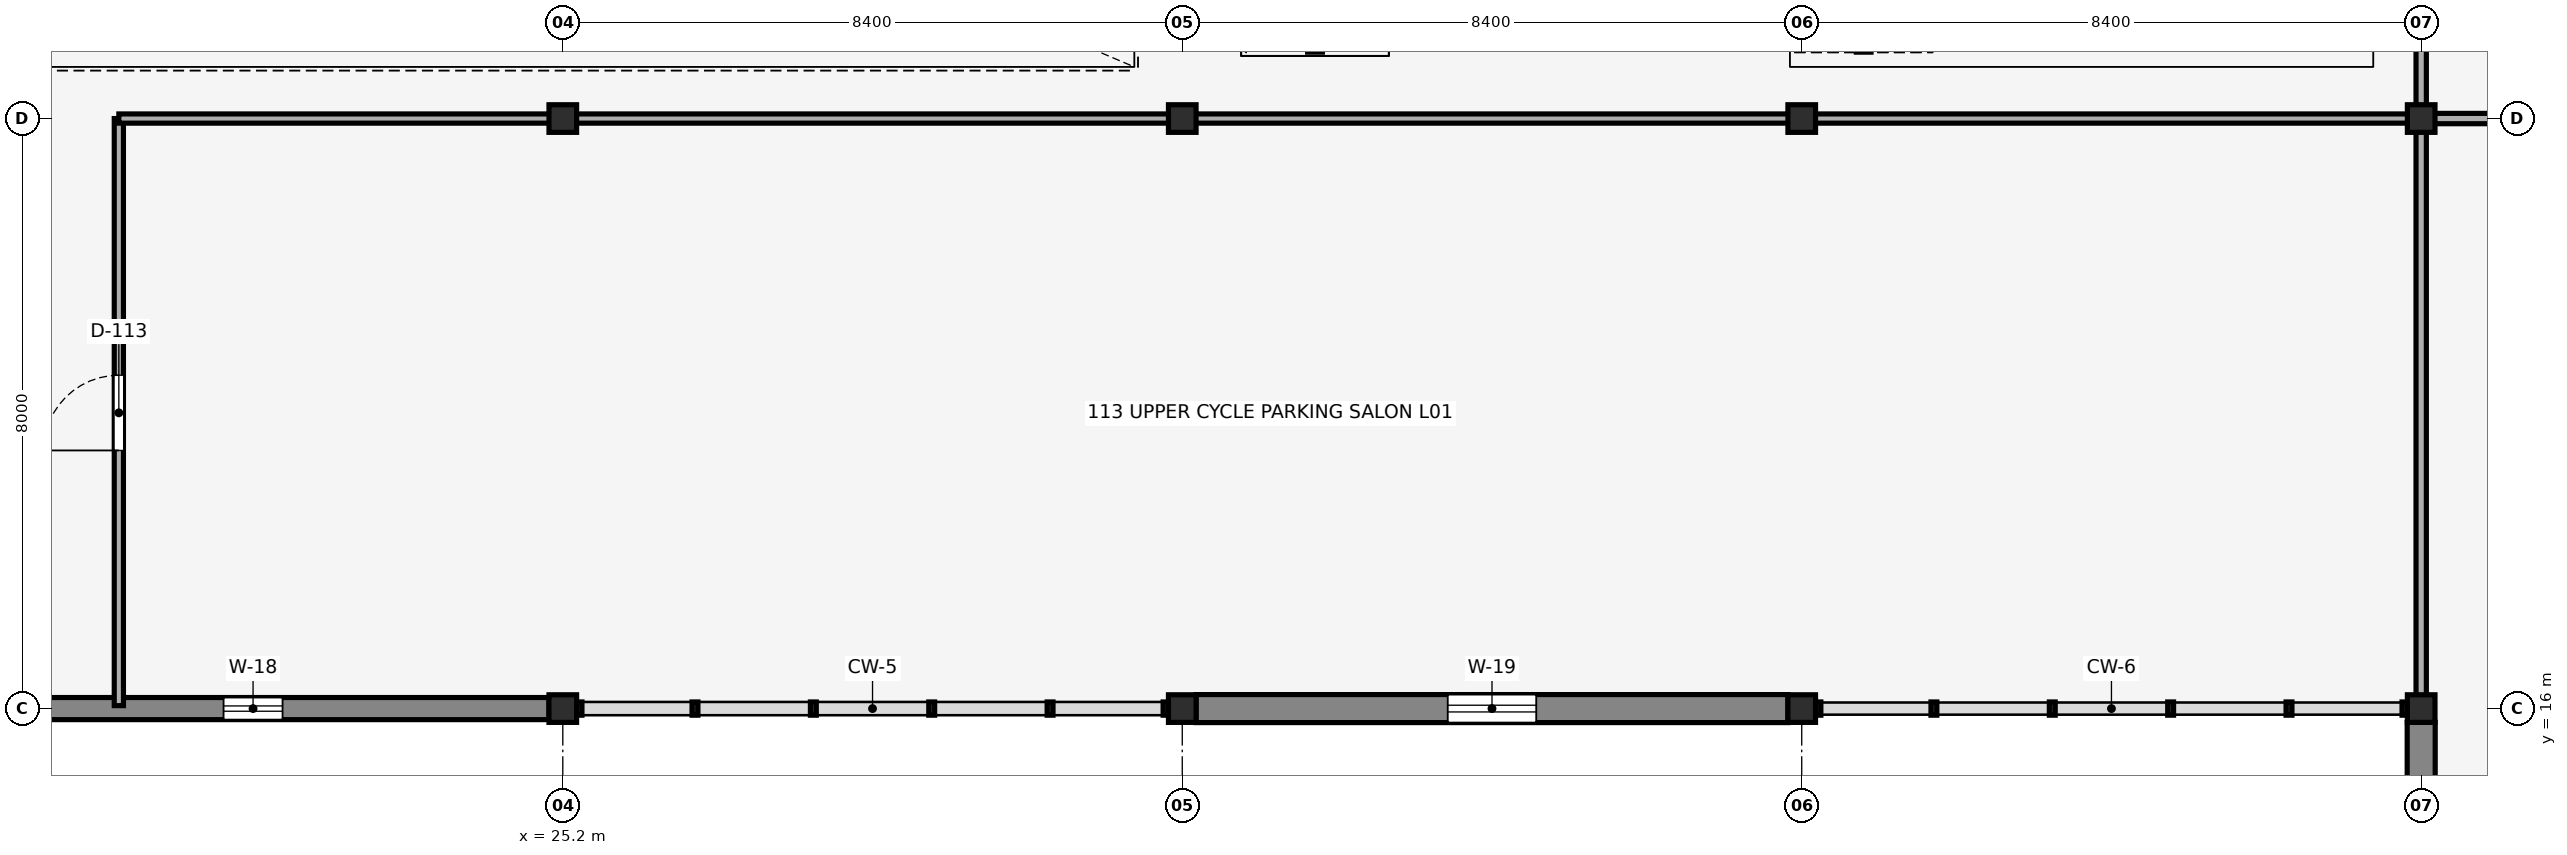
"""IFC4 building model, lengths in metres.
Left out: names, types, materials, properties, quantities, classifications, styles, units other than length and angle.
Written with IfcOpenShell. Run it as: python <this file> out.ifc"""

import sys

from ifc_helpers import new_model, si_unit, direction, frame, frame_2d, origin, origin_2d, place, context, subcontext, project, spatial, rectangle, i_section, extrude, element, fill, save


model = new_model("IFC4")
c1 = context("Model", 3, precision=1e-05, world=origin(), true_north=direction((0.0, 1.0)))
c2 = subcontext(c1, "Body", "Model", "MODEL_VIEW")
j1 = project(units=[si_unit("LENGTHUNIT", "METRE"), si_unit("PLANEANGLEUNIT", "RADIAN")], contexts=[c1])
p1 = place(None, origin())
s1 = spatial("IfcSite", under=j1, at=p1, CompositionType="ELEMENT")
p2 = place(p1, origin())
s2 = spatial("IfcBuilding", under=s1, at=p2, CompositionType="ELEMENT")
p3 = place(p2, frame((0.0, 0.0, 5.44)))
s3 = spatial("IfcBuildingStorey", under=s2, at=p3, CompositionType="ELEMENT", Elevation=5.44)
for number, where, z_axis, x_axis in (
    (1, (25.2, 16.0, 0.0), (0.0, 0.0, 1.0), (1.0, 0.0, 0.0)),
    (2, (25.2, 24.0, 0.0), (0.0, 0.0, 1.0), (1.0, 0.0, 0.0)),
    (3, (33.6, 16.0, 0.0), (0.0, 0.0, 1.0), (1.0, 0.0, 0.0)),
    (4, (33.6, 24.0, 0.0), (0.0, 0.0, 1.0), (1.0, 0.0, 0.0)),
    (5, (42.0, 16.0, 0.0), (0.0, 0.0, 1.0), (1.0, 0.0, 0.0)),
    (6, (42.0, 24.0, 0.0), (0.0, 0.0, 1.0), (1.0, 0.0, 0.0)),
    (7, (50.4, 16.0, 0.0), (0.0, 0.0, 1.0), (1.0, 0.0, 0.0)),
    (8, (50.4, 24.0, 0.0), (0.0, 0.0, 1.0), (1.0, 0.0, 0.0)),
):
    element("IfcColumn", number, at=place(p3, frame(where, z_axis=z_axis, x_axis=x_axis)), inside=s3, PredefinedType="COLUMN", context=c2, shape_type="SweptSolid", body=[
        extrude(i_section(OverallWidth=0.375, OverallDepth=0.375, WebThickness=0.017, FlangeThickness=0.027, FilletRadius=0.015, at=origin_2d()), origin(), (0.0, 0.0, 1.0), 3.8),
    ])
p4 = place(p3, frame((50.4, 8.16, 0.0), z_axis=(0.0, 0.0, 1.0), x_axis=(0.0, 1.0, 0.0)))
e9 = element("IfcWall", 9, at=p4, inside=s3, PredefinedType="SOLIDWALL", context=c2, shape_type="SweptSolid", body=[
    extrude(rectangle(XDim=7.652, YDim=0.38, at=frame_2d((3.826, 0.0))), origin(), (0.0, 0.0, 1.0), 3.442),
])
p5 = place(p4, frame((3.351, 0.0, 0.65), z_axis=(0.0, 0.0, 1.0), x_axis=(1.0, 0.0, 0.0)))
e10 = element("IfcOpeningElement", 10, at=p5, cuts=e9, PredefinedType="OPENING", context=c2, shape_type="SweptSolid", body=[
    extrude(rectangle(XDim=0.95, YDim=2.1, at=frame_2d((0.475, 1.05))), frame((0.0, 0.2, 0.0), z_axis=(0.0, -1.0, 0.0), x_axis=(1.0, 0.0, 0.0)), (0.0, 0.0, 1.0), 0.4),
])
p6 = place(p3, frame((16.987, 16.0, 0.0), z_axis=(0.0, 0.0, 1.0), x_axis=(1.0, 0.0, 0.0)))
e11 = element("IfcWall", 11, at=p6, inside=s3, PredefinedType="SOLIDWALL", context=c2, shape_type="SweptSolid", body=[
    extrude(rectangle(XDim=8.025, YDim=0.3, at=frame_2d((4.013, 0.0))), origin(), (0.0, 0.0, 1.0), 3.45),
])
p7 = place(p6, frame((3.613, 0.0, 0.65), z_axis=(0.0, 0.0, 1.0), x_axis=(1.0, 0.0, 0.0)))
e12 = element("IfcOpeningElement", 12, at=p7, cuts=e11, PredefinedType="OPENING", context=c2, shape_type="SweptSolid", body=[
    extrude(rectangle(XDim=0.8, YDim=1.85, at=frame_2d((0.4, 0.925))), frame((0.0, 0.16, 0.0), z_axis=(0.0, -1.0, 0.0), x_axis=(1.0, 0.0, 0.0)), (0.0, 0.0, 1.0), 0.32),
])
p8 = place(p3, frame((33.787, 16.0, 0.0), z_axis=(0.0, 0.0, 1.0), x_axis=(1.0, 0.0, 0.0)))
e13 = element("IfcWall", 13, at=p8, inside=s3, PredefinedType="SOLIDWALL", context=c2, shape_type="SweptSolid", body=[
    extrude(rectangle(XDim=8.025, YDim=0.38, at=frame_2d((4.013, 0.0))), origin(), (0.0, 0.0, 1.0), 3.45),
])
p9 = place(p8, frame((3.413, 0.0, 1.55), z_axis=(0.0, 0.0, 1.0), x_axis=(1.0, 0.0, 0.0)))
e14 = element("IfcOpeningElement", 14, at=p9, cuts=e13, PredefinedType="OPENING", context=c2, shape_type="SweptSolid", body=[
    extrude(rectangle(XDim=1.2, YDim=0.95, at=frame_2d((0.6, 0.475))), frame((0.0, 0.2, 0.0), z_axis=(0.0, -1.0, 0.0), x_axis=(1.0, 0.0, 0.0)), (0.0, 0.0, 1.0), 0.4),
])
p10 = place(p3, frame((50.577, 24.0, 0.0), z_axis=(0.0, 0.0, 1.0), x_axis=(1.0, 0.0, 0.0)))
e15 = element("IfcWall", 15, at=p10, inside=s3, PredefinedType="PARTITIONING", context=c2, shape_type="SweptSolid", body=[
    extrude(rectangle(XDim=8.045, YDim=0.14, at=frame_2d((4.023, 0.0))), origin(), (0.0, 0.0, 1.0), 3.26),
])
p11 = place(p10, frame((4.703, 0.0, 0.0), z_axis=(0.0, 0.0, 1.0), x_axis=(-1.0, 0.0, 0.0)))
e16 = element("IfcOpeningElement", 16, at=p11, cuts=e15, PredefinedType="OPENING", context=c2, shape_type="SweptSolid", body=[
    extrude(rectangle(XDim=1.18, YDim=2.22, at=frame_2d((0.59, 1.11))), frame((0.0, 0.08, 0.0), z_axis=(0.0, -1.0, 0.0), x_axis=(1.0, 0.0, 0.0)), (0.0, 0.0, 1.0), 0.16),
])
p12 = place(p3, frame((19.18, 16.04, 0.0), z_axis=(0.0, 0.0, 1.0), x_axis=(0.0, 1.0, 0.0)))
e17 = element("IfcWall", 17, at=p12, inside=s3, PredefinedType="PARTITIONING", context=c2, shape_type="SweptSolid", body=[
    extrude(rectangle(XDim=7.96, YDim=0.125, at=frame_2d((3.98, 0.0))), origin(), (0.0, 0.0, 1.0), 3.442),
])
p13 = place(p12, frame((3.46, 0.0, 0.0), z_axis=(0.0, 0.0, 1.0), x_axis=(1.0, 0.0, 0.0)))
e18 = element("IfcOpeningElement", 18, at=p13, cuts=e17, PredefinedType="OPENING", context=c2, shape_type="SweptSolid", body=[
    extrude(rectangle(XDim=1.02, YDim=2.16, at=frame_2d((0.51, 1.08))), frame((0.0, 0.073, 0.0), z_axis=(0.0, -1.0, 0.0), x_axis=(1.0, 0.0, 0.0)), (0.0, 0.0, 1.0), 0.145),
])
for number, where, z_axis, x_axis in (
    (19, (50.4, 24.177, 0.0), (0.0, 0.0, 1.0), (0.0, 1.0, 0.0)),
    (20, (50.4, 16.177, 0.0), (0.0, 0.0, 1.0), (0.0, 1.0, 0.0)),
):
    element("IfcWall", number, at=place(p3, frame(where, z_axis=z_axis, x_axis=x_axis)), inside=s3, PredefinedType="PARTITIONING", context=c2, shape_type="SweptSolid", body=[
        extrude(rectangle(XDim=7.646, YDim=0.14, at=frame_2d((3.823, 0.0))), origin(), (0.0, 0.0, 1.0), 3.337),
    ])
p14 = place(p3, frame((19.18, 24.0, 0.0), z_axis=(0.0, 0.0, 1.0), x_axis=(1.0, 0.0, 0.0)))
e21 = element("IfcWall", 21, at=p14, inside=s3, PredefinedType="PARTITIONING", context=c2, shape_type="SweptSolid", body=[
    extrude(rectangle(XDim=5.843, YDim=0.125, at=frame_2d((2.921, 0.0))), origin(), (0.0, 0.0, 1.0), 3.26),
])
for number, where, z_axis, x_axis in (
    (22, (25.377, 24.0, 0.0), (0.0, 0.0, 1.0), (1.0, 0.0, 0.0)),
    (23, (33.777, 24.0, 0.0), (0.0, 0.0, 1.0), (1.0, 0.0, 0.0)),
    (24, (42.177, 24.0, 0.0), (0.0, 0.0, 1.0), (1.0, 0.0, 0.0)),
):
    element("IfcWall", number, at=place(p3, frame(where, z_axis=z_axis, x_axis=x_axis)), inside=s3, PredefinedType="PARTITIONING", context=c2, shape_type="SweptSolid", body=[
        extrude(rectangle(XDim=8.045, YDim=0.125, at=frame_2d((4.023, 0.0))), origin(), (0.0, 0.0, 1.0), 3.26),
    ])
p15 = place(p7, origin())
e25 = element("IfcWindow", 25, at=p15, inside=s3, PartitioningType="SINGLE_PANEL", PredefinedType="WINDOW", context=c2, shape_type="SweptSolid", body=[
    extrude(rectangle(XDim=0.8, YDim=1.85, at=frame_2d((0.4, 0.925))), frame((0.0, 0.03, 0.0), z_axis=(0.0, -1.0, 0.0), x_axis=(1.0, 0.0, 0.0)), (0.0, 0.0, 1.0), 0.06),
])
fill(e12, e25)
p16 = place(p9, origin())
e26 = element("IfcWindow", 26, at=p16, inside=s3, PartitioningType="SINGLE_PANEL", PredefinedType="WINDOW", context=c2, shape_type="SweptSolid", body=[
    extrude(rectangle(XDim=1.2, YDim=0.95, at=frame_2d((0.6, 0.475))), frame((0.0, 0.03, 0.0), z_axis=(0.0, -1.0, 0.0), x_axis=(1.0, 0.0, 0.0)), (0.0, 0.0, 1.0), 0.06),
])
fill(e14, e26)
p17 = place(p13, origin())
e27 = element("IfcDoor", 27, at=p17, inside=s3, OperationType="SINGLE_SWING_LEFT", PredefinedType="DOOR", context=c2, shape_type="SweptSolid", body=[
    extrude(rectangle(XDim=1.02, YDim=2.16, at=frame_2d((0.51, 1.08))), frame((0.0, 0.025, 0.0), z_axis=(0.0, -1.0, 0.0), x_axis=(1.0, 0.0, 0.0)), (0.0, 0.0, 1.0), 0.05),
])
fill(e18, e27)
save(model, sys.argv[1])
